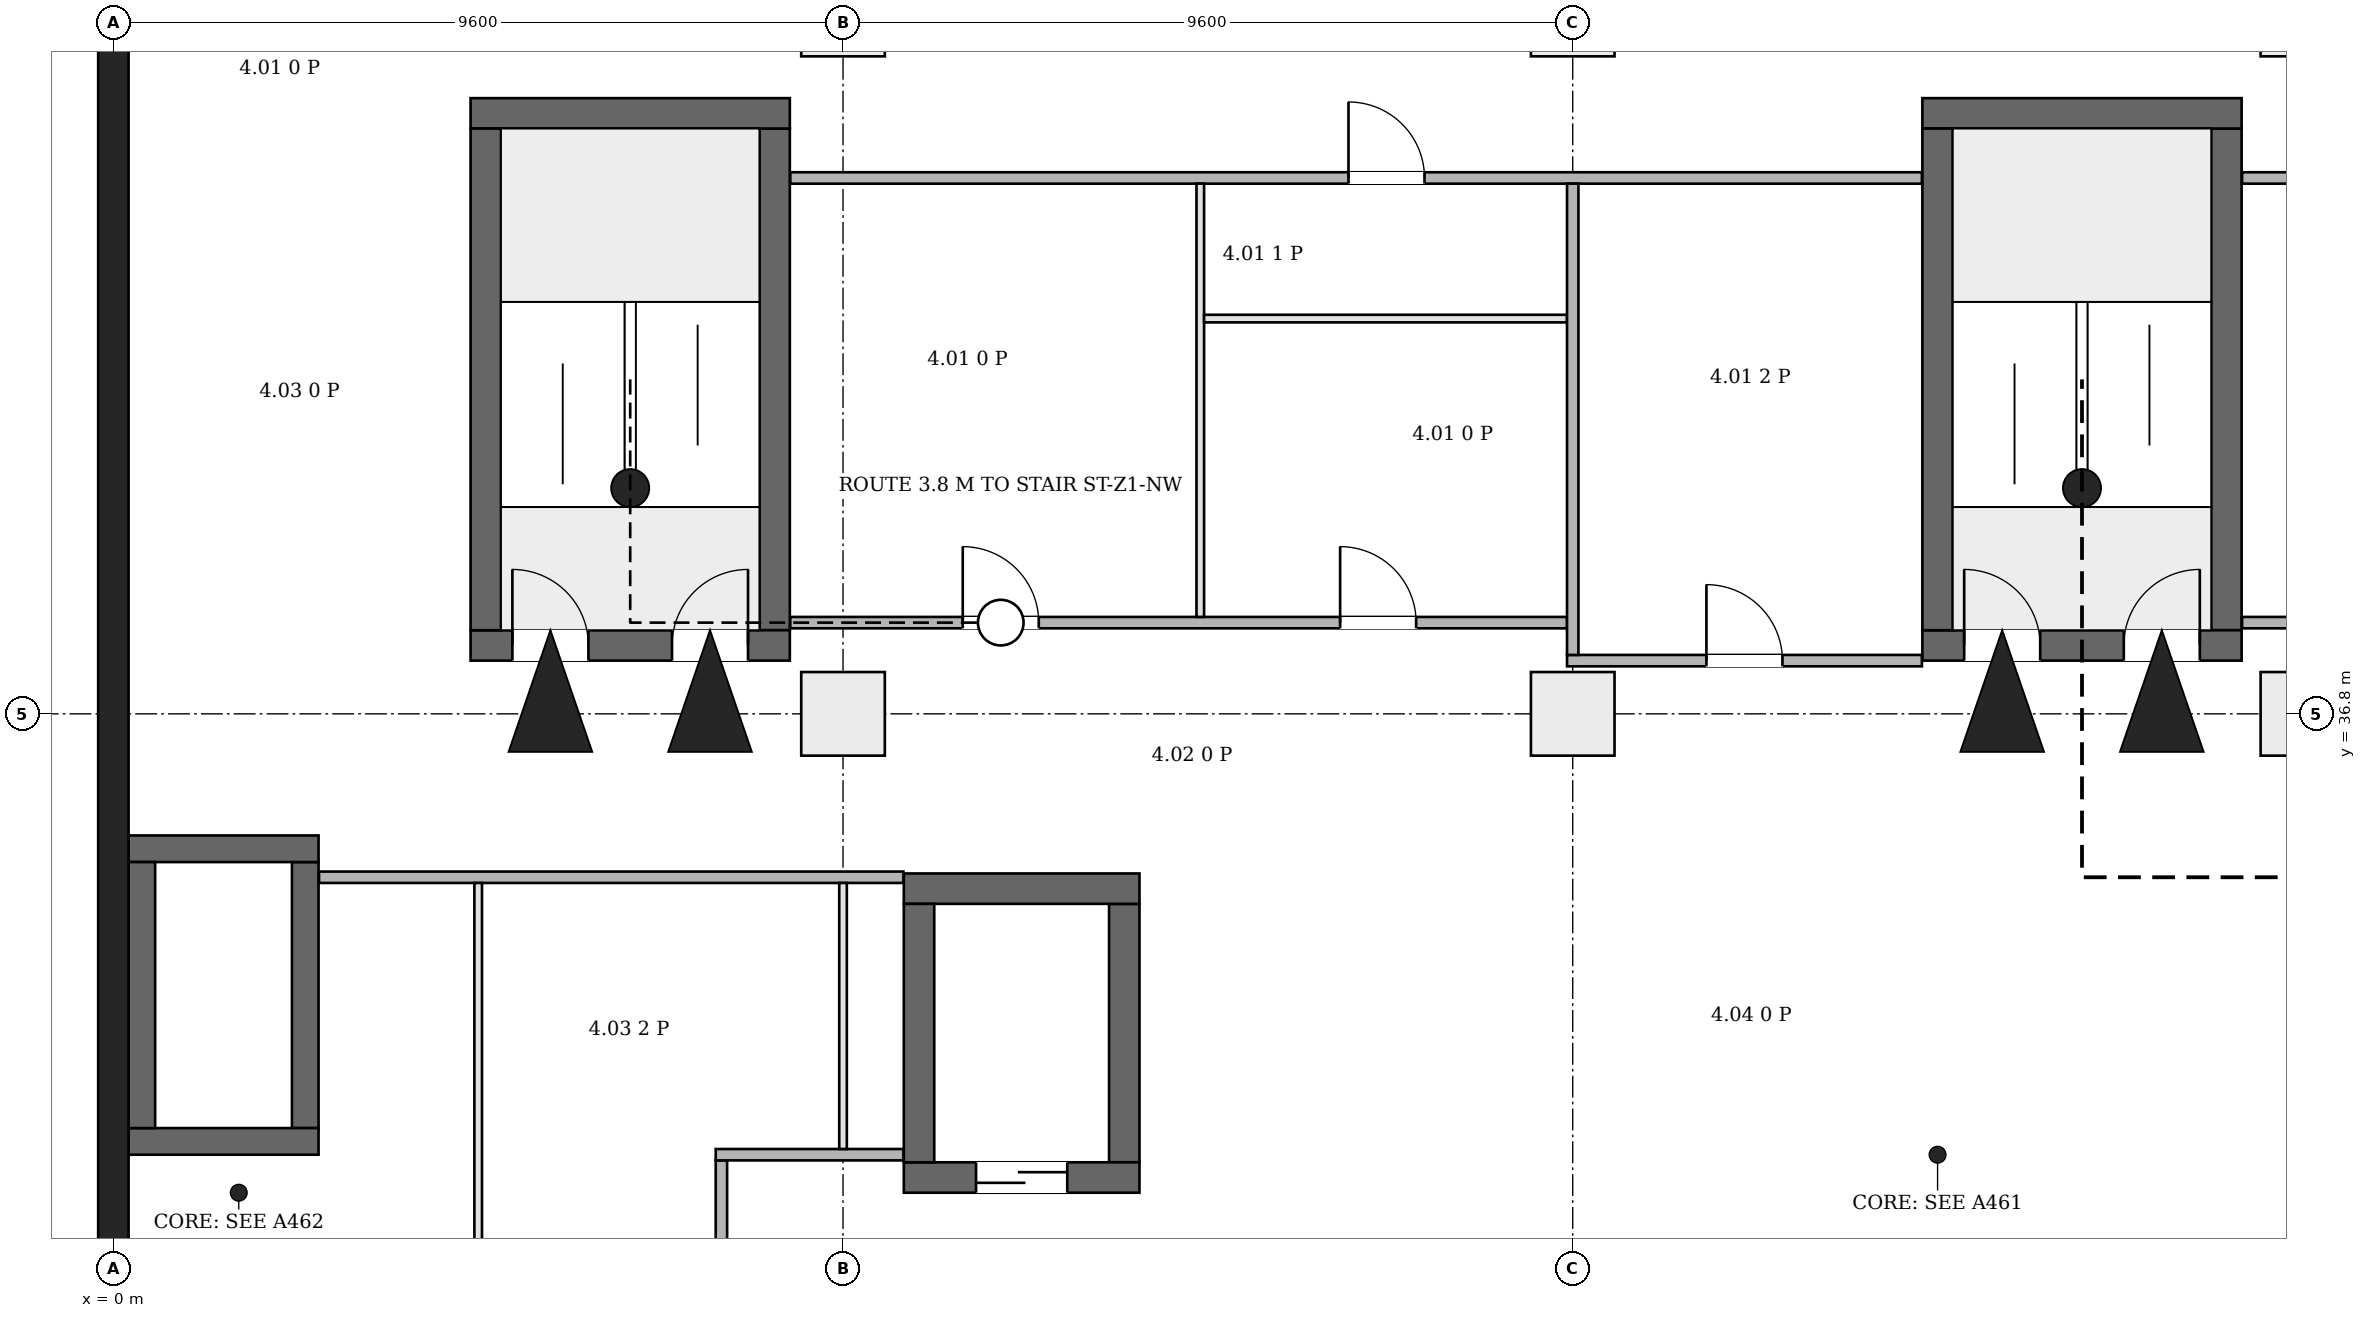
"""IFC4 building model, lengths in metres.
Left out: names, types, materials, properties, quantities, classifications, styles, units other than length and angle.
Written with IfcOpenShell. Run it as: python <this file> out.ifc"""

import sys

from ifc_helpers import new_model, si_unit, direction, frame, frame_2d, origin, origin_2d, place, context, subcontext, project, spatial, rectangle, extrude, element, fill, save


model = new_model("IFC4")
c1 = context("Model", 3, precision=1e-05, world=origin(), true_north=direction((0.0, 1.0)))
c2 = subcontext(c1, "Body", "Model", "MODEL_VIEW")
j1 = project(units=[si_unit("LENGTHUNIT", "METRE"), si_unit("PLANEANGLEUNIT", "RADIAN")], contexts=[c1])
p1 = place(None, origin())
s1 = spatial("IfcSite", under=j1, at=p1, CompositionType="ELEMENT")
p2 = place(p1, origin())
s2 = spatial("IfcBuilding", under=s1, at=p2, CompositionType="ELEMENT")
p3 = place(p2, frame((0.0, 0.0, 26.7)))
s3 = spatial("IfcBuildingStorey", under=s2, at=p3, CompositionType="ELEMENT", Elevation=26.7)
p4 = place(p3, frame((0.0, -0.2, 0.0), z_axis=(0.0, 0.0, 1.0), x_axis=(0.0, 1.0, 0.0)))
e1 = element("IfcWall", 1, at=p4, inside=s3, PredefinedType="SHEAR", context=c2, shape_type="SweptSolid", body=[
    extrude(rectangle(XDim=46.88, YDim=0.4, at=frame_2d((23.44, 0.0))), origin(), (0.0, 0.0, 1.0), 5.2),
])
p5 = place(p3, frame((4.7, 37.7, 0.0), z_axis=(0.0, 0.0, 1.0), x_axis=(1.0, 0.0, 0.0)))
e2 = element("IfcWall", 2, at=p5, inside=s3, PredefinedType="SHEAR", context=c2, shape_type="SweptSolid", body=[
    extrude(rectangle(XDim=4.2, YDim=0.4, at=frame_2d((2.1, 0.0))), origin(), (0.0, 0.0, 1.0), 5.2),
])
p6 = place(p5, frame((0.55, 0.0, 0.0)))
e3 = element("IfcOpeningElement", 3, at=p6, cuts=e2, PredefinedType="OPENING", context=c2, shape_type="SweptSolid", body=[
    extrude(rectangle(XDim=1.0, YDim=2.1, at=frame_2d((0.5, 1.05))), frame((0.0, 0.21, 0.0), z_axis=(0.0, -1.0, 0.0), x_axis=(1.0, 0.0, 0.0)), (0.0, 0.0, 1.0), 0.42),
])
p7 = place(p5, frame((2.65, 0.0, 0.0)))
e4 = element("IfcOpeningElement", 4, at=p7, cuts=e2, PredefinedType="OPENING", context=c2, shape_type="SweptSolid", body=[
    extrude(rectangle(XDim=1.0, YDim=2.1, at=frame_2d((0.5, 1.05))), frame((0.0, 0.21, 0.0), z_axis=(0.0, -1.0, 0.0), x_axis=(1.0, 0.0, 0.0)), (0.0, 0.0, 1.0), 0.42),
])
p8 = place(p3, frame((4.7, 44.7, 0.0), z_axis=(0.0, 0.0, 1.0), x_axis=(1.0, 0.0, 0.0)))
e5 = element("IfcWall", 5, at=p8, inside=s3, PredefinedType="SHEAR", context=c2, shape_type="SweptSolid", body=[
    extrude(rectangle(XDim=4.2, YDim=0.4, at=frame_2d((2.1, 0.0))), origin(), (0.0, 0.0, 1.0), 5.2),
])
for number, where, z_axis, x_axis in (
    (6, (4.9, 37.9, 0.0), (0.0, 0.0, 1.0), (0.0, 1.0, 0.0)),
    (7, (8.7, 37.9, 0.0), (0.0, 0.0, 1.0), (0.0, 1.0, 0.0)),
):
    element("IfcWall", number, at=place(p3, frame(where, z_axis=z_axis, x_axis=x_axis)), inside=s3, PredefinedType="SHEAR", context=c2, shape_type="SweptSolid", body=[
        extrude(rectangle(XDim=6.6, YDim=0.4, at=frame_2d((3.3, 0.0))), origin(), (0.0, 0.0, 1.0), 5.2),
    ])
p9 = place(p3, frame((23.8, 37.7, 0.0), z_axis=(0.0, 0.0, 1.0), x_axis=(1.0, 0.0, 0.0)))
e8 = element("IfcWall", 8, at=p9, inside=s3, PredefinedType="SHEAR", context=c2, shape_type="SweptSolid", body=[
    extrude(rectangle(XDim=4.2, YDim=0.4, at=frame_2d((2.1, 0.0))), origin(), (0.0, 0.0, 1.0), 5.2),
])
p10 = place(p9, frame((0.55, 0.0, 0.0)))
e9 = element("IfcOpeningElement", 9, at=p10, cuts=e8, PredefinedType="OPENING", context=c2, shape_type="SweptSolid", body=[
    extrude(rectangle(XDim=1.0, YDim=2.1, at=frame_2d((0.5, 1.05))), frame((0.0, 0.21, 0.0), z_axis=(0.0, -1.0, 0.0), x_axis=(1.0, 0.0, 0.0)), (0.0, 0.0, 1.0), 0.42),
])
p11 = place(p9, frame((2.65, 0.0, 0.0)))
e10 = element("IfcOpeningElement", 10, at=p11, cuts=e8, PredefinedType="OPENING", context=c2, shape_type="SweptSolid", body=[
    extrude(rectangle(XDim=1.0, YDim=2.1, at=frame_2d((0.5, 1.05))), frame((0.0, 0.21, 0.0), z_axis=(0.0, -1.0, 0.0), x_axis=(1.0, 0.0, 0.0)), (0.0, 0.0, 1.0), 0.42),
])
p12 = place(p3, frame((23.8, 44.7, 0.0), z_axis=(0.0, 0.0, 1.0), x_axis=(1.0, 0.0, 0.0)))
e11 = element("IfcWall", 11, at=p12, inside=s3, PredefinedType="SHEAR", context=c2, shape_type="SweptSolid", body=[
    extrude(rectangle(XDim=4.2, YDim=0.4, at=frame_2d((2.1, 0.0))), origin(), (0.0, 0.0, 1.0), 5.2),
])
for number, where, z_axis, x_axis in (
    (12, (24.0, 37.9, 0.0), (0.0, 0.0, 1.0), (0.0, 1.0, 0.0)),
    (13, (27.8, 37.9, 0.0), (0.0, 0.0, 1.0), (0.0, 1.0, 0.0)),
):
    element("IfcWall", number, at=place(p3, frame(where, z_axis=z_axis, x_axis=x_axis)), inside=s3, PredefinedType="SHEAR", context=c2, shape_type="SweptSolid", body=[
        extrude(rectangle(XDim=6.6, YDim=0.4, at=frame_2d((3.3, 0.0))), origin(), (0.0, 0.0, 1.0), 5.2),
    ])
for number, where, z_axis, x_axis in (
    (14, (0.2, 31.175, 0.0), (0.0, 0.0, 1.0), (1.0, 0.0, 0.0)),
    (15, (0.2, 35.025, 0.0), (0.0, 0.0, 1.0), (1.0, 0.0, 0.0)),
):
    element("IfcWall", number, at=place(p3, frame(where, z_axis=z_axis, x_axis=x_axis)), inside=s3, PredefinedType="SHEAR", context=c2, shape_type="SweptSolid", body=[
        extrude(rectangle(XDim=2.5, YDim=0.35, at=frame_2d((1.25, 0.0))), origin(), (0.0, 0.0, 1.0), 5.2),
    ])
for number, where, z_axis, x_axis in (
    (16, (0.375, 31.35, 0.0), (0.0, 0.0, 1.0), (0.0, 1.0, 0.0)),
    (17, (2.525, 31.35, 0.0), (0.0, 0.0, 1.0), (0.0, 1.0, 0.0)),
):
    element("IfcWall", number, at=place(p3, frame(where, z_axis=z_axis, x_axis=x_axis)), inside=s3, PredefinedType="SHEAR", context=c2, shape_type="SweptSolid", body=[
        extrude(rectangle(XDim=3.5, YDim=0.35, at=frame_2d((1.75, 0.0))), origin(), (0.0, 0.0, 1.0), 5.2),
    ])
p13 = place(p3, frame((10.4, 30.7, 0.0), z_axis=(0.0, 0.0, 1.0), x_axis=(1.0, 0.0, 0.0)))
e18 = element("IfcWall", 18, at=p13, inside=s3, PredefinedType="SHEAR", context=c2, shape_type="SweptSolid", body=[
    extrude(rectangle(XDim=3.1, YDim=0.4, at=frame_2d((1.55, 0.0))), origin(), (0.0, 0.0, 1.0), 5.2),
])
p14 = place(p13, frame((0.95, 0.0, 0.0)))
e19 = element("IfcOpeningElement", 19, at=p14, cuts=e18, PredefinedType="OPENING", context=c2, shape_type="SweptSolid", body=[
    extrude(rectangle(XDim=1.2, YDim=2.1, at=frame_2d((0.6, 1.05))), frame((0.0, 0.21, 0.0), z_axis=(0.0, -1.0, 0.0), x_axis=(1.0, 0.0, 0.0)), (0.0, 0.0, 1.0), 0.42),
])
p15 = place(p3, frame((10.4, 34.5, 0.0), z_axis=(0.0, 0.0, 1.0), x_axis=(1.0, 0.0, 0.0)))
e20 = element("IfcWall", 20, at=p15, inside=s3, PredefinedType="SHEAR", context=c2, shape_type="SweptSolid", body=[
    extrude(rectangle(XDim=3.1, YDim=0.4, at=frame_2d((1.55, 0.0))), origin(), (0.0, 0.0, 1.0), 5.2),
])
for number, where, z_axis, x_axis in (
    (21, (10.6, 30.9, 0.0), (0.0, 0.0, 1.0), (0.0, 1.0, 0.0)),
    (22, (13.3, 30.9, 0.0), (0.0, 0.0, 1.0), (0.0, 1.0, 0.0)),
):
    element("IfcWall", number, at=place(p3, frame(where, z_axis=z_axis, x_axis=x_axis)), inside=s3, PredefinedType="SHEAR", context=c2, shape_type="SweptSolid", body=[
        extrude(rectangle(XDim=3.4, YDim=0.4, at=frame_2d((1.7, 0.0))), origin(), (0.0, 0.0, 1.0), 5.2),
    ])
for number, where, z_axis, x_axis in (
    (23, (9.6, 36.8, 0.0), (0.0, 0.0, 1.0), (1.0, 0.0, 0.0)),
    (24, (19.2, 36.8, 0.0), (0.0, 0.0, 1.0), (1.0, 0.0, 0.0)),
    (25, (28.8, 36.8, 0.0), (0.0, 0.0, 1.0), (1.0, 0.0, 0.0)),
    (26, (9.6, 46.0, 0.0), (0.0, 0.0, 1.0), (1.0, 0.0, 0.0)),
    (27, (19.2, 46.0, 0.0), (0.0, 0.0, 1.0), (1.0, 0.0, 0.0)),
    (28, (28.8, 46.0, 0.0), (0.0, 0.0, 1.0), (1.0, 0.0, 0.0)),
):
    element("IfcColumn", number, at=place(p3, frame(where, z_axis=z_axis, x_axis=x_axis)), inside=s3, PredefinedType="COLUMN", context=c2, shape_type="SweptSolid", body=[
        extrude(rectangle(XDim=1.1, YDim=1.1, at=origin_2d()), origin(), (0.0, 0.0, 1.0), 5.2),
    ])
p16 = place(p3, frame((2.706, 34.65, 0.0), z_axis=(0.0, 0.0, 1.0), x_axis=(1.0, 0.0, 0.0)))
e29 = element("IfcWall", 29, at=p16, inside=s3, PredefinedType="PARTITIONING", context=c2, shape_type="SweptSolid", body=[
    extrude(rectangle(XDim=7.688, YDim=0.15, at=frame_2d((3.844, 0.0))), origin(), (0.0, 0.0, 1.0), 4.85),
])
p17 = place(p3, frame((4.8, 25.175, 0.0), z_axis=(0.0, 0.0, 1.0), x_axis=(0.0, 1.0, 0.0)))
e30 = element("IfcWall", 30, at=p17, inside=s3, PredefinedType="PARTITIONING", context=c2, shape_type="SweptSolid", body=[
    extrude(rectangle(XDim=9.4, YDim=0.1, at=frame_2d((4.7, 0.0))), origin(), (0.0, 0.0, 1.0), 4.85),
])
p18 = place(p3, frame((8.0, 27.275, 0.0), z_axis=(0.0, 0.0, 1.0), x_axis=(0.0, 1.0, 0.0)))
e31 = element("IfcWall", 31, at=p18, inside=s3, PredefinedType="PARTITIONING", context=c2, shape_type="SweptSolid", body=[
    extrude(rectangle(XDim=3.65, YDim=0.15, at=frame_2d((1.825, 0.0))), origin(), (0.0, 0.0, 1.0), 4.85),
])
p19 = place(p3, frame((7.925, 31.0, 0.0), z_axis=(0.0, 0.0, 1.0), x_axis=(1.0, 0.0, 0.0)))
e32 = element("IfcWall", 32, at=p19, inside=s3, PredefinedType="PARTITIONING", context=c2, shape_type="SweptSolid", body=[
    extrude(rectangle(XDim=2.469, YDim=0.15, at=frame_2d((1.234, 0.0))), origin(), (0.0, 0.0, 1.0), 4.85),
])
p20 = place(p3, frame((8.906, 38.0, 0.0), z_axis=(0.0, 0.0, 1.0), x_axis=(1.0, 0.0, 0.0)))
e33 = element("IfcWall", 33, at=p20, inside=s3, PredefinedType="PARTITIONING", context=c2, shape_type="SweptSolid", body=[
    extrude(rectangle(XDim=10.219, YDim=0.15, at=frame_2d((5.109, 0.0))), origin(), (0.0, 0.0, 1.0), 4.85),
])
p21 = place(p20, frame((2.269, 0.0, 0.0)))
e34 = element("IfcOpeningElement", 34, at=p21, cuts=e33, PredefinedType="OPENING", context=c2, shape_type="SweptSolid", body=[
    extrude(rectangle(XDim=1.0, YDim=2.1, at=frame_2d((0.5, 1.05))), frame((0.0, 0.085, 0.0), z_axis=(0.0, -1.0, 0.0), x_axis=(1.0, 0.0, 0.0)), (0.0, 0.0, 1.0), 0.17),
])
p22 = place(p20, frame((7.234, 0.0, 0.0)))
e35 = element("IfcOpeningElement", 35, at=p22, cuts=e33, PredefinedType="OPENING", context=c2, shape_type="SweptSolid", body=[
    extrude(rectangle(XDim=1.0, YDim=2.1, at=frame_2d((0.5, 1.05))), frame((0.0, 0.085, 0.0), z_axis=(0.0, -1.0, 0.0), x_axis=(1.0, 0.0, 0.0)), (0.0, 0.0, 1.0), 0.17),
])
p23 = place(p3, frame((8.906, 43.85, 0.0), z_axis=(0.0, 0.0, 1.0), x_axis=(1.0, 0.0, 0.0)))
e36 = element("IfcWall", 36, at=p23, inside=s3, PredefinedType="PARTITIONING", context=c2, shape_type="SweptSolid", body=[
    extrude(rectangle(XDim=14.888, YDim=0.15, at=frame_2d((7.444, 0.0))), origin(), (0.0, 0.0, 1.0), 4.85),
])
p24 = place(p23, frame((7.344, 0.0, 0.0)))
e37 = element("IfcOpeningElement", 37, at=p24, cuts=e36, PredefinedType="OPENING", context=c2, shape_type="SweptSolid", body=[
    extrude(rectangle(XDim=1.0, YDim=2.1, at=frame_2d((0.5, 1.05))), frame((0.0, 0.085, 0.0), z_axis=(0.0, -1.0, 0.0), x_axis=(1.0, 0.0, 0.0)), (0.0, 0.0, 1.0), 0.17),
])
p25 = place(p3, frame((9.6, 31.075, 0.0), z_axis=(0.0, 0.0, 1.0), x_axis=(0.0, 1.0, 0.0)))
e38 = element("IfcWall", 38, at=p25, inside=s3, PredefinedType="PARTITIONING", context=c2, shape_type="SweptSolid", body=[
    extrude(rectangle(XDim=3.5, YDim=0.1, at=frame_2d((1.75, 0.0))), origin(), (0.0, 0.0, 1.0), 4.45),
])
p26 = place(p3, frame((14.3, 38.075, 0.0), z_axis=(0.0, 0.0, 1.0), x_axis=(0.0, 1.0, 0.0)))
e39 = element("IfcWall", 39, at=p26, inside=s3, PredefinedType="PARTITIONING", context=c2, shape_type="SweptSolid", body=[
    extrude(rectangle(XDim=5.7, YDim=0.1, at=frame_2d((2.85, 0.0))), origin(), (0.0, 0.0, 1.0), 4.85),
])
p27 = place(p3, frame((14.35, 42.0, 0.0), z_axis=(0.0, 0.0, 1.0), x_axis=(1.0, 0.0, 0.0)))
e40 = element("IfcWall", 40, at=p27, inside=s3, PredefinedType="PARTITIONING", context=c2, shape_type="SweptSolid", body=[
    extrude(rectangle(XDim=4.775, YDim=0.1, at=frame_2d((2.387, 0.0))), origin(), (0.0, 0.0, 1.0), 4.85),
])
p28 = place(p3, frame((19.125, 37.5, 0.0), z_axis=(0.0, 0.0, 1.0), x_axis=(1.0, 0.0, 0.0)))
e41 = element("IfcWall", 41, at=p28, inside=s3, PredefinedType="PARTITIONING", context=c2, shape_type="SweptSolid", body=[
    extrude(rectangle(XDim=4.669, YDim=0.15, at=frame_2d((2.334, 0.0))), origin(), (0.0, 0.0, 1.0), 4.85),
])
p29 = place(p28, frame((1.834, 0.0, 0.0)))
e42 = element("IfcOpeningElement", 42, at=p29, cuts=e41, PredefinedType="OPENING", context=c2, shape_type="SweptSolid", body=[
    extrude(rectangle(XDim=1.0, YDim=2.1, at=frame_2d((0.5, 1.05))), frame((0.0, 0.085, 0.0), z_axis=(0.0, -1.0, 0.0), x_axis=(1.0, 0.0, 0.0)), (0.0, 0.0, 1.0), 0.17),
])
p30 = place(p3, frame((19.2, 37.575, 0.0), z_axis=(0.0, 0.0, 1.0), x_axis=(0.0, 1.0, 0.0)))
e43 = element("IfcWall", 43, at=p30, inside=s3, PredefinedType="PARTITIONING", context=c2, shape_type="SweptSolid", body=[
    extrude(rectangle(XDim=6.2, YDim=0.15, at=frame_2d((3.1, 0.0))), origin(), (0.0, 0.0, 1.0), 4.45),
])
p31 = place(p3, frame((28.006, 38.0, 0.0), z_axis=(0.0, 0.0, 1.0), x_axis=(1.0, 0.0, 0.0)))
e44 = element("IfcWall", 44, at=p31, inside=s3, PredefinedType="PARTITIONING", context=c2, shape_type="SweptSolid", body=[
    extrude(rectangle(XDim=1.919, YDim=0.15, at=frame_2d((0.959, 0.0))), origin(), (0.0, 0.0, 1.0), 4.85),
])
p32 = place(p3, frame((28.006, 43.85, 0.0), z_axis=(0.0, 0.0, 1.0), x_axis=(1.0, 0.0, 0.0)))
e45 = element("IfcWall", 45, at=p32, inside=s3, PredefinedType="PARTITIONING", context=c2, shape_type="SweptSolid", body=[
    extrude(rectangle(XDim=29.388, YDim=0.15, at=frame_2d((14.694, 0.0))), origin(), (0.0, 0.0, 1.0), 4.85),
])
p33 = place(p6, origin())
e46 = element("IfcDoor", 46, at=p33, inside=s3, OperationType="SINGLE_SWING_RIGHT", PredefinedType="DOOR", context=c2, shape_type="SweptSolid", body=[
    extrude(rectangle(XDim=1.0, YDim=2.1, at=frame_2d((0.5, 1.05))), frame((0.0, 0.025, 0.0), z_axis=(0.0, -1.0, 0.0), x_axis=(1.0, 0.0, 0.0)), (0.0, 0.0, 1.0), 0.05),
])
fill(e3, e46)
p34 = place(p7, origin())
e47 = element("IfcDoor", 47, at=p34, inside=s3, OperationType="SINGLE_SWING_LEFT", PredefinedType="DOOR", context=c2, shape_type="SweptSolid", body=[
    extrude(rectangle(XDim=1.0, YDim=2.1, at=frame_2d((0.5, 1.05))), frame((0.0, 0.025, 0.0), z_axis=(0.0, -1.0, 0.0), x_axis=(1.0, 0.0, 0.0)), (0.0, 0.0, 1.0), 0.05),
])
fill(e4, e47)
p35 = place(p10, origin())
e48 = element("IfcDoor", 48, at=p35, inside=s3, OperationType="SINGLE_SWING_RIGHT", PredefinedType="DOOR", context=c2, shape_type="SweptSolid", body=[
    extrude(rectangle(XDim=1.0, YDim=2.1, at=frame_2d((0.5, 1.05))), frame((0.0, 0.025, 0.0), z_axis=(0.0, -1.0, 0.0), x_axis=(1.0, 0.0, 0.0)), (0.0, 0.0, 1.0), 0.05),
])
fill(e9, e48)
p36 = place(p11, origin())
e49 = element("IfcDoor", 49, at=p36, inside=s3, OperationType="SINGLE_SWING_LEFT", PredefinedType="DOOR", context=c2, shape_type="SweptSolid", body=[
    extrude(rectangle(XDim=1.0, YDim=2.1, at=frame_2d((0.5, 1.05))), frame((0.0, 0.025, 0.0), z_axis=(0.0, -1.0, 0.0), x_axis=(1.0, 0.0, 0.0)), (0.0, 0.0, 1.0), 0.05),
])
fill(e10, e49)
p37 = place(p14, origin())
e50 = element("IfcDoor", 50, at=p37, inside=s3, OperationType="DOUBLE_DOOR_SLIDING", PredefinedType="DOOR", context=c2, shape_type="SweptSolid", body=[
    extrude(rectangle(XDim=1.2, YDim=2.1, at=frame_2d((0.6, 1.05))), frame((0.0, 0.025, 0.0), z_axis=(0.0, -1.0, 0.0), x_axis=(1.0, 0.0, 0.0)), (0.0, 0.0, 1.0), 0.05),
])
fill(e19, e50)
p38 = place(p29, origin())
e51 = element("IfcDoor", 51, at=p38, inside=s3, OperationType="SINGLE_SWING_LEFT", PredefinedType="DOOR", context=c2, shape_type="SweptSolid", body=[
    extrude(rectangle(XDim=1.0, YDim=2.1, at=frame_2d((0.5, 1.05))), frame((0.0, 0.025, 0.0), z_axis=(0.0, -1.0, 0.0), x_axis=(1.0, 0.0, 0.0)), (0.0, 0.0, 1.0), 0.05),
])
fill(e42, e51)
p39 = place(p21, origin())
e52 = element("IfcDoor", 52, at=p39, inside=s3, OperationType="SINGLE_SWING_LEFT", PredefinedType="DOOR", context=c2, shape_type="SweptSolid", body=[
    extrude(rectangle(XDim=1.0, YDim=2.1, at=frame_2d((0.5, 1.05))), frame((0.0, 0.025, 0.0), z_axis=(0.0, -1.0, 0.0), x_axis=(1.0, 0.0, 0.0)), (0.0, 0.0, 1.0), 0.05),
])
fill(e34, e52)
p40 = place(p22, origin())
e53 = element("IfcDoor", 53, at=p40, inside=s3, OperationType="SINGLE_SWING_RIGHT", PredefinedType="DOOR", context=c2, shape_type="SweptSolid", body=[
    extrude(rectangle(XDim=1.0, YDim=2.1, at=frame_2d((0.5, 1.05))), frame((0.0, 0.025, 0.0), z_axis=(0.0, -1.0, 0.0), x_axis=(1.0, 0.0, 0.0)), (0.0, 0.0, 1.0), 0.05),
])
fill(e35, e53)
p41 = place(p24, origin())
e54 = element("IfcDoor", 54, at=p41, inside=s3, OperationType="SINGLE_SWING_LEFT", PredefinedType="DOOR", context=c2, shape_type="SweptSolid", body=[
    extrude(rectangle(XDim=1.0, YDim=2.1, at=frame_2d((0.5, 1.05))), frame((0.0, 0.025, 0.0), z_axis=(0.0, -1.0, 0.0), x_axis=(1.0, 0.0, 0.0)), (0.0, 0.0, 1.0), 0.05),
])
fill(e37, e54)
save(model, sys.argv[1])
